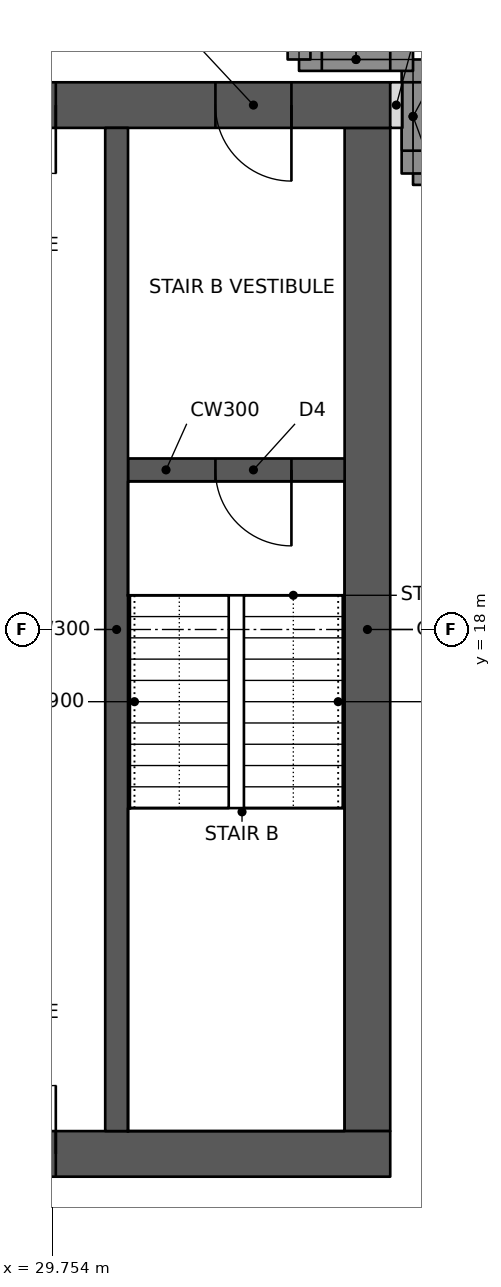
"""IFC4 building model, lengths in metres.
Left out: names, types, materials, properties, quantities, classifications, styles, units other than length and angle.
Written with IfcOpenShell. Run it as: python <this file> out.ifc"""

import sys

from ifc_helpers import new_model, si_unit, direction, frame, frame_2d, origin, place, context, subcontext, project, spatial, rectangle, extrude, element, fill, save


model = new_model("IFC4")
c1 = context("Model", 3, precision=1e-05, world=origin(), true_north=direction((0.0, 1.0)))
c2 = subcontext(c1, "Body", "Model", "MODEL_VIEW")
j1 = project(units=[si_unit("LENGTHUNIT", "METRE"), si_unit("PLANEANGLEUNIT", "RADIAN")], contexts=[c1])
p1 = place(None, origin())
s1 = spatial("IfcSite", under=j1, at=p1, CompositionType="ELEMENT")
p2 = place(p1, origin())
s2 = spatial("IfcBuilding", under=s1, at=p2, CompositionType="ELEMENT")
p3 = place(p2, frame((0.0, 0.0, 233.8)))
s3 = spatial("IfcBuildingStorey", under=s2, at=p3, CompositionType="ELEMENT", Elevation=233.8)
p4 = place(p3, frame((10.8, 11.1, 0.0), z_axis=(0.0, 0.0, 1.0), x_axis=(1.0, 0.0, 0.0)))
e1 = element("IfcWall", 1, at=p4, inside=s3, PredefinedType="SHEAR", context=c2, shape_type="SweptSolid", body=[
    extrude(rectangle(XDim=23.4, YDim=0.6, at=frame_2d((11.7, 0.0))), origin(), (0.0, 0.0, 1.0), 3.6),
])
p5 = place(p4, frame((1.0, 0.0, 0.0)))
e2 = element("IfcOpeningElement", 2, at=p5, cuts=e1, PredefinedType="OPENING", context=c2, shape_type="SweptSolid", body=[
    extrude(rectangle(XDim=1.0, YDim=2.1, at=frame_2d((0.5, 1.05))), frame((0.0, 0.31, 0.0), z_axis=(0.0, -1.0, 0.0), x_axis=(1.0, 0.0, 0.0)), (0.0, 0.0, 1.0), 0.62),
])
p6 = place(p4, frame((17.2, 0.0, 0.0)))
e3 = element("IfcOpeningElement", 3, at=p6, cuts=e1, PredefinedType="OPENING", context=c2, shape_type="SweptSolid", body=[
    extrude(rectangle(XDim=1.8, YDim=2.1, at=frame_2d((0.9, 1.05))), frame((0.0, 0.31, 0.0), z_axis=(0.0, -1.0, 0.0), x_axis=(1.0, 0.0, 0.0)), (0.0, 0.0, 1.0), 0.62),
])
p7 = place(p3, frame((10.8, 24.9, 0.0), z_axis=(0.0, 0.0, 1.0), x_axis=(1.0, 0.0, 0.0)))
e4 = element("IfcWall", 4, at=p7, inside=s3, PredefinedType="SHEAR", context=c2, shape_type="SweptSolid", body=[
    extrude(rectangle(XDim=23.4, YDim=0.6, at=frame_2d((11.7, 0.0))), origin(), (0.0, 0.0, 1.0), 3.6),
])
p8 = place(p7, frame((17.2, 0.0, 0.0)))
e5 = element("IfcOpeningElement", 5, at=p8, cuts=e4, PredefinedType="OPENING", context=c2, shape_type="SweptSolid", body=[
    extrude(rectangle(XDim=1.8, YDim=2.1, at=frame_2d((0.9, 1.05))), frame((0.0, 0.31, 0.0), z_axis=(0.0, -1.0, 0.0), x_axis=(1.0, 0.0, 0.0)), (0.0, 0.0, 1.0), 0.62),
])
p9 = place(p7, frame((21.1, 0.0, 0.0)))
e6 = element("IfcOpeningElement", 6, at=p9, cuts=e4, PredefinedType="OPENING", context=c2, shape_type="SweptSolid", body=[
    extrude(rectangle(XDim=1.0, YDim=2.1, at=frame_2d((0.5, 1.05))), frame((0.0, 0.31, 0.0), z_axis=(0.0, -1.0, 0.0), x_axis=(1.0, 0.0, 0.0)), (0.0, 0.0, 1.0), 0.62),
])
p10 = place(p7, frame((4.9, 0.0, 0.0)))
e7 = element("IfcOpeningElement", 7, at=p10, cuts=e4, PredefinedType="OPENING", context=c2, shape_type="SweptSolid", body=[
    extrude(rectangle(XDim=1.0, YDim=2.1, at=frame_2d((0.5, 1.05))), frame((0.0, 0.31, 0.0), z_axis=(0.0, -1.0, 0.0), x_axis=(1.0, 0.0, 0.0)), (0.0, 0.0, 1.0), 0.62),
])
p11 = place(p3, frame((33.9, 11.4, 0.0), z_axis=(0.0, 0.0, 1.0), x_axis=(0.0, 1.0, 0.0)))
e8 = element("IfcWall", 8, at=p11, inside=s3, PredefinedType="SHEAR", context=c2, shape_type="SweptSolid", body=[
    extrude(rectangle(XDim=13.2, YDim=0.6, at=frame_2d((6.6, 0.0))), origin(), (0.0, 0.0, 1.0), 3.6),
])
p12 = place(p3, frame((30.6, 11.4, 0.0), z_axis=(0.0, 0.0, 1.0), x_axis=(0.0, 1.0, 0.0)))
e9 = element("IfcWall", 9, at=p12, inside=s3, PredefinedType="SHEAR", context=c2, shape_type="SweptSolid", body=[
    extrude(rectangle(XDim=13.2, YDim=0.3, at=frame_2d((6.6, 0.0))), origin(), (0.0, 0.0, 1.0), 3.6),
])
p13 = place(p3, frame((30.75, 20.1, 0.0), z_axis=(0.0, 0.0, 1.0), x_axis=(1.0, 0.0, 0.0)))
e10 = element("IfcWall", 10, at=p13, inside=s3, PredefinedType="SHEAR", context=c2, shape_type="SweptSolid", body=[
    extrude(rectangle(XDim=2.85, YDim=0.3, at=frame_2d((1.425, 0.0))), origin(), (0.0, 0.0, 1.0), 3.6),
])
p14 = place(p13, frame((1.15, 0.0, 0.0)))
e11 = element("IfcOpeningElement", 11, at=p14, cuts=e10, PredefinedType="OPENING", context=c2, shape_type="SweptSolid", body=[
    extrude(rectangle(XDim=1.0, YDim=2.1, at=frame_2d((0.5, 1.05))), frame((0.0, 0.16, 0.0), z_axis=(0.0, -1.0, 0.0), x_axis=(1.0, 0.0, 0.0)), (0.0, 0.0, 1.0), 0.32),
])
p15 = place(p3, frame((36.0, 24.0, 0.0), z_axis=(0.0, 0.0, 1.0), x_axis=(-1.0, 0.0, 0.0)))
e12 = element("IfcWall", 12, at=p15, inside=s3, PredefinedType="SOLIDWALL", context=c2, shape_type="SweptSolid", body=[
    extrude(rectangle(XDim=1.5, YDim=0.3, at=frame_2d((0.75, 0.0))), origin(), (0.0, 0.0, 1.0), 2.62),
])
p16 = place(p3, frame((34.5, 24.0, 0.0), z_axis=(0.0, 0.0, 1.0), x_axis=(0.0, 1.0, 0.0)))
e13 = element("IfcWall", 13, at=p16, inside=s3, PredefinedType="SOLIDWALL", context=c2, shape_type="SweptSolid", body=[
    extrude(rectangle(XDim=1.5, YDim=0.3, at=frame_2d((0.75, 0.0))), origin(), (0.0, 0.0, 1.0), 3.4),
])
p17 = place(p16, frame((0.3, 0.0, 0.6)))
e14 = element("IfcOpeningElement", 14, at=p17, cuts=e13, PredefinedType="OPENING", context=c2, shape_type="SweptSolid", body=[
    extrude(rectangle(XDim=0.9, YDim=2.2, at=frame_2d((0.45, 1.1))), frame((0.0, 0.16, 0.0), z_axis=(0.0, -1.0, 0.0), x_axis=(1.0, 0.0, 0.0)), (0.0, 0.0, 1.0), 0.32),
])
p18 = place(p3, frame((34.5, 25.5, 0.0), z_axis=(0.0, 0.0, 1.0), x_axis=(-1.0, 0.0, 0.0)))
e15 = element("IfcWall", 15, at=p18, inside=s3, PredefinedType="SOLIDWALL", context=c2, shape_type="SweptSolid", body=[
    extrude(rectangle(XDim=1.5, YDim=0.3, at=frame_2d((0.75, 0.0))), origin(), (0.0, 0.0, 1.0), 3.4),
])
p19 = place(p18, frame((0.3, 0.0, 0.6)))
e16 = element("IfcOpeningElement", 16, at=p19, cuts=e15, PredefinedType="OPENING", context=c2, shape_type="SweptSolid", body=[
    extrude(rectangle(XDim=0.9, YDim=2.2, at=frame_2d((0.45, 1.1))), frame((0.0, 0.16, 0.0), z_axis=(0.0, -1.0, 0.0), x_axis=(1.0, 0.0, 0.0)), (0.0, 0.0, 1.0), 0.32),
])
p20 = place(p3, frame((33.0, 25.5, 0.0), z_axis=(0.0, 0.0, 1.0), x_axis=(0.0, 1.0, 0.0)))
e17 = element("IfcWall", 17, at=p20, inside=s3, PredefinedType="SOLIDWALL", context=c2, shape_type="SweptSolid", body=[
    extrude(rectangle(XDim=1.5, YDim=0.3, at=frame_2d((0.75, 0.0))), origin(), (0.0, 0.0, 1.0), 2.62),
])
p21 = place(p3, frame((34.2, 24.9, 0.0), z_axis=(0.0, 0.0, 1.0), x_axis=(1.0, 0.0, 0.0)))
e18 = element("IfcWall", 18, at=p21, inside=s3, PredefinedType="PARTITIONING", context=c2, shape_type="SweptSolid", body=[
    extrude(rectangle(XDim=0.16, YDim=0.6, at=frame_2d((0.08, 0.0))), origin(), (0.0, 0.0, 1.0), 3.4),
])
p22 = place(p17, origin())
e19 = element("IfcWindow", 19, at=p22, inside=s3, PartitioningType="SINGLE_PANEL", PredefinedType="WINDOW", context=c2, shape_type="SweptSolid", body=[
    extrude(rectangle(XDim=0.9, YDim=2.2, at=frame_2d((0.45, 1.1))), frame((0.0, 0.03, 0.0), z_axis=(0.0, -1.0, 0.0), x_axis=(1.0, 0.0, 0.0)), (0.0, 0.0, 1.0), 0.06),
])
fill(e14, e19)
p23 = place(p19, origin())
e20 = element("IfcWindow", 20, at=p23, inside=s3, PartitioningType="SINGLE_PANEL", PredefinedType="WINDOW", context=c2, shape_type="SweptSolid", body=[
    extrude(rectangle(XDim=0.9, YDim=2.2, at=frame_2d((0.45, 1.1))), frame((0.0, 0.03, 0.0), z_axis=(0.0, -1.0, 0.0), x_axis=(1.0, 0.0, 0.0)), (0.0, 0.0, 1.0), 0.06),
])
fill(e16, e20)
p24 = place(p6, origin())
e21 = element("IfcDoor", 21, at=p24, inside=s3, OperationType="DOUBLE_DOOR_SINGLE_SWING", PredefinedType="DOOR", context=c2, shape_type="SweptSolid", body=[
    extrude(rectangle(XDim=1.8, YDim=2.1, at=frame_2d((0.9, 1.05))), frame((0.0, 0.025, 0.0), z_axis=(0.0, -1.0, 0.0), x_axis=(1.0, 0.0, 0.0)), (0.0, 0.0, 1.0), 0.05),
])
fill(e3, e21)
p25 = place(p8, frame((1.8, 0.0, 0.0), z_axis=(0.0, 0.0, 1.0), x_axis=(-1.0, 0.0, 0.0)))
e22 = element("IfcDoor", 22, at=p25, inside=s3, OperationType="DOUBLE_DOOR_SINGLE_SWING", PredefinedType="DOOR", context=c2, shape_type="SweptSolid", body=[
    extrude(rectangle(XDim=1.8, YDim=2.1, at=frame_2d((0.9, 1.05))), frame((0.0, 0.025, 0.0), z_axis=(0.0, -1.0, 0.0), x_axis=(1.0, 0.0, 0.0)), (0.0, 0.0, 1.0), 0.05),
])
fill(e5, e22)
p26 = place(p9, frame((1.0, 0.0, 0.0), z_axis=(0.0, 0.0, 1.0), x_axis=(-1.0, 0.0, 0.0)))
e23 = element("IfcDoor", 23, at=p26, inside=s3, OperationType="SINGLE_SWING_LEFT", PredefinedType="DOOR", context=c2, shape_type="SweptSolid", body=[
    extrude(rectangle(XDim=1.0, YDim=2.1, at=frame_2d((0.5, 1.05))), frame((0.0, 0.025, 0.0), z_axis=(0.0, -1.0, 0.0), x_axis=(1.0, 0.0, 0.0)), (0.0, 0.0, 1.0), 0.05),
])
fill(e6, e23)
p27 = place(p14, frame((1.0, 0.0, 0.0), z_axis=(0.0, 0.0, 1.0), x_axis=(-1.0, 0.0, 0.0)))
e24 = element("IfcDoor", 24, at=p27, inside=s3, OperationType="SINGLE_SWING_LEFT", PredefinedType="DOOR", context=c2, shape_type="SweptSolid", body=[
    extrude(rectangle(XDim=1.0, YDim=2.1, at=frame_2d((0.5, 1.05))), frame((0.0, 0.025, 0.0), z_axis=(0.0, -1.0, 0.0), x_axis=(1.0, 0.0, 0.0)), (0.0, 0.0, 1.0), 0.05),
])
fill(e11, e24)
save(model, sys.argv[1])
